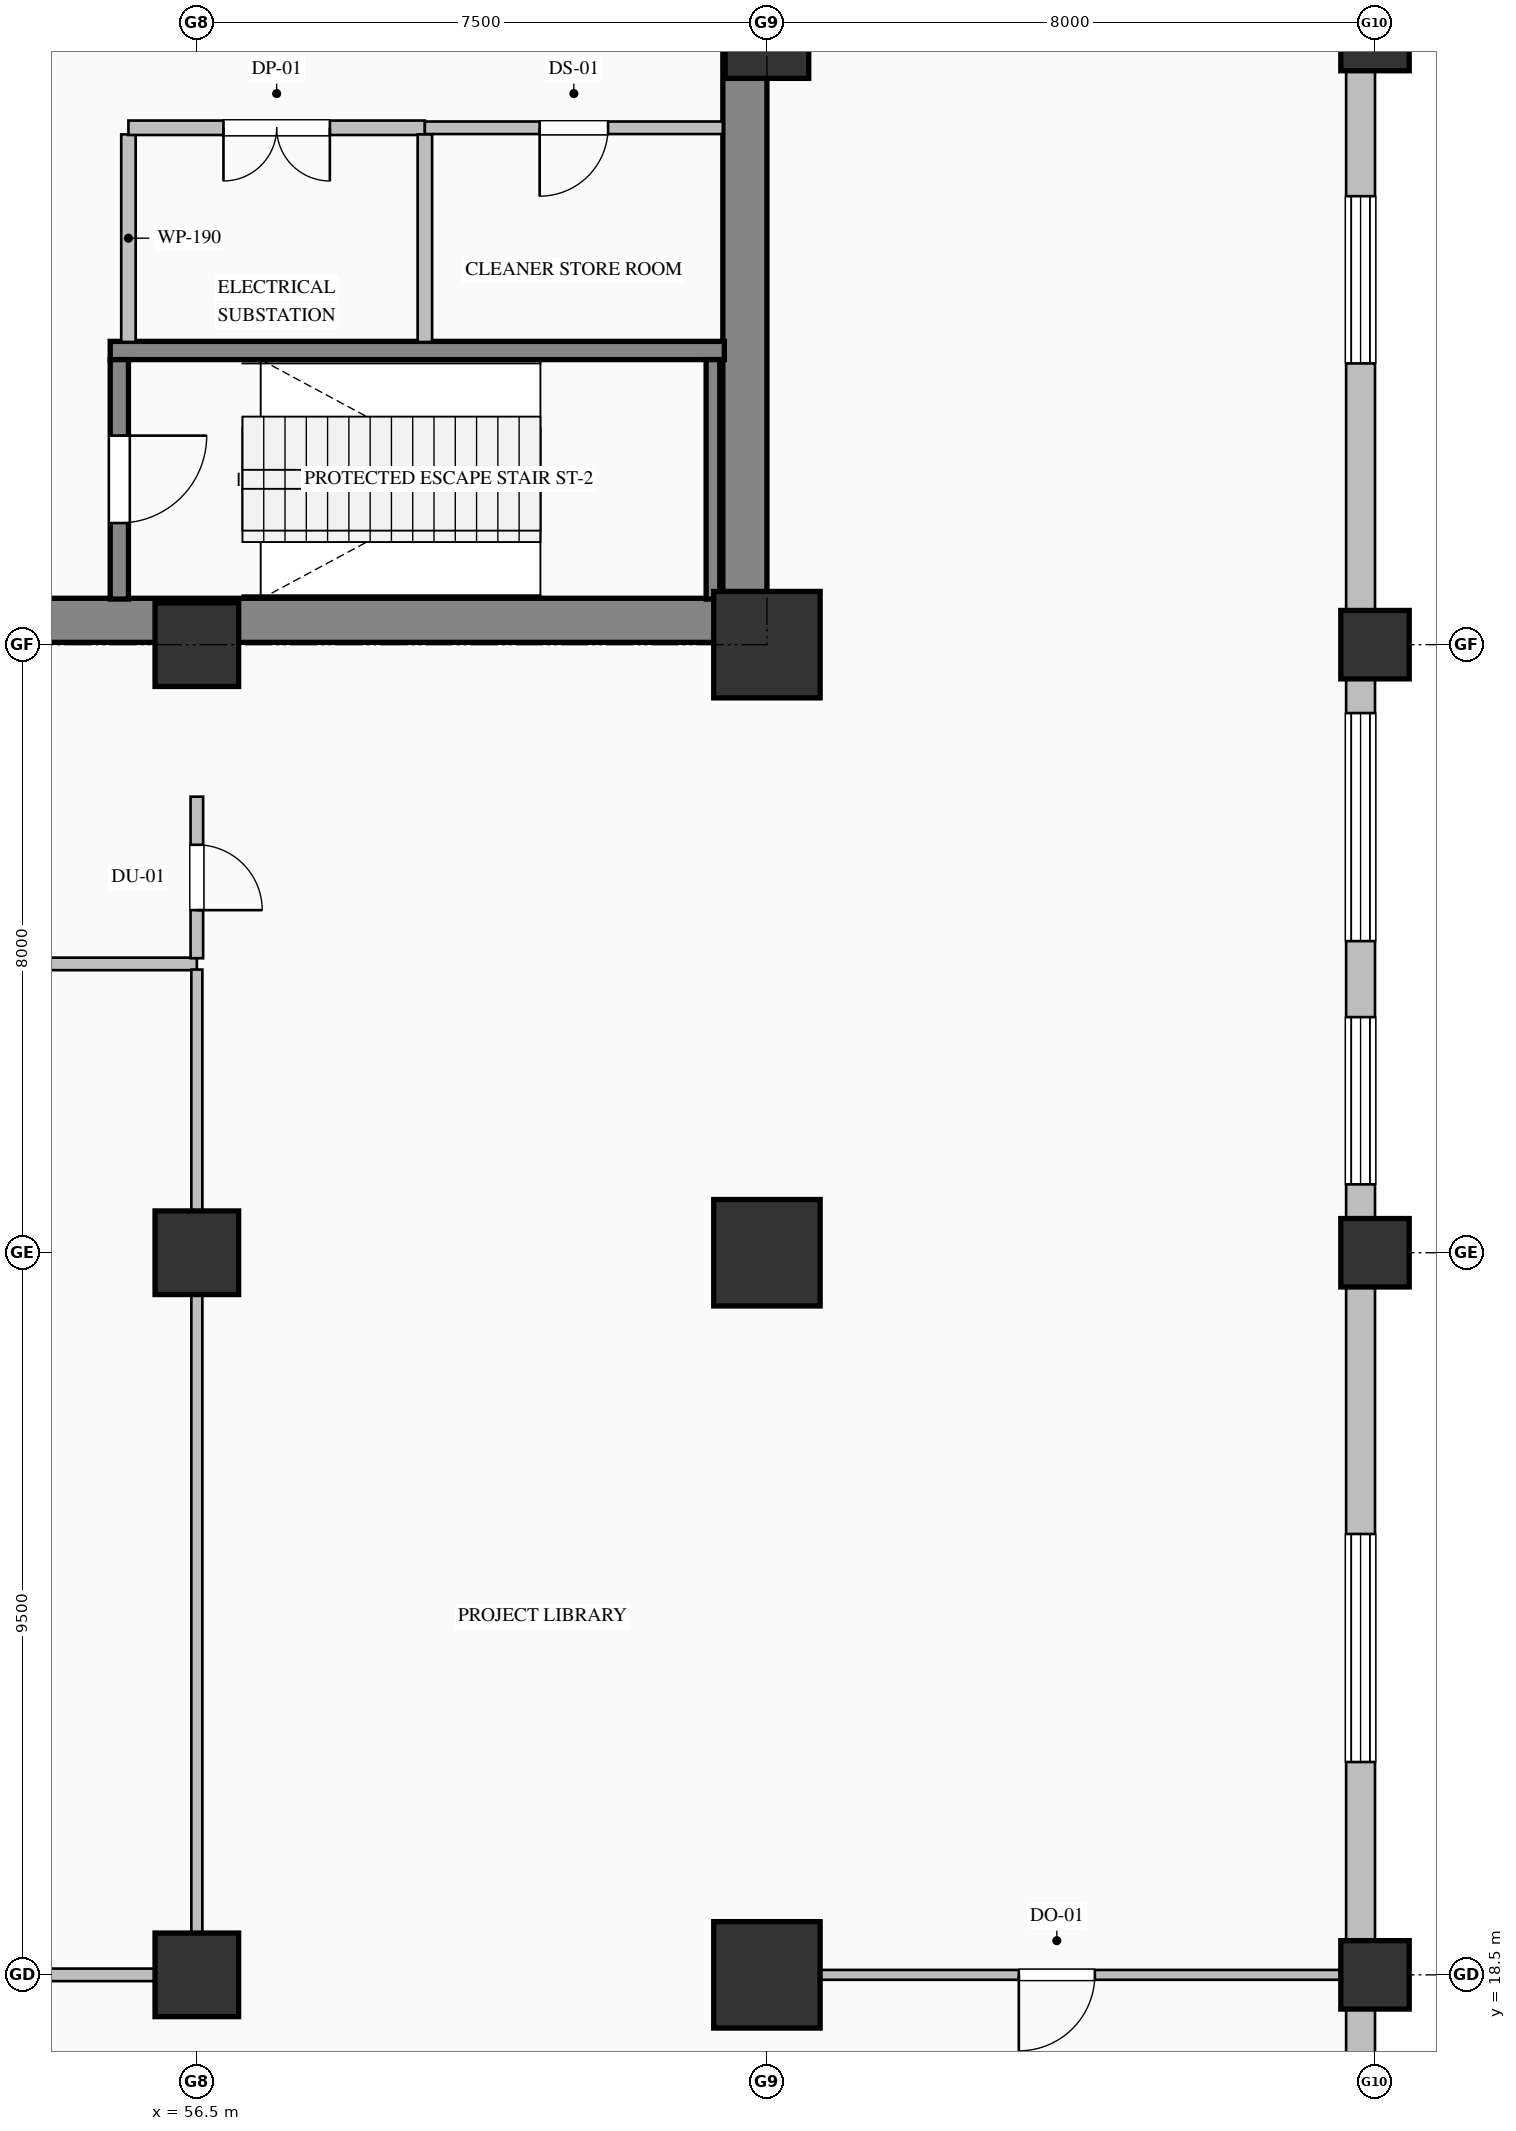
"""IFC4 building model, lengths in metres.
Left out: names, types, materials, properties, quantities, classifications, styles, units other than length and angle.
Written with IfcOpenShell. Run it as: python <this file> out.ifc"""

import sys

from ifc_helpers import new_model, si_unit, direction, frame, frame_2d, origin, origin_2d, place, context, subcontext, project, spatial, rectangle, hollow_rectangle, extrude, element, fill, save


model = new_model("IFC4")
c1 = context("Model", 3, precision=1e-05, world=origin(), true_north=direction((0.0, 1.0)))
c2 = subcontext(c1, "Body", "Model", "MODEL_VIEW")
j1 = project(units=[si_unit("LENGTHUNIT", "METRE"), si_unit("PLANEANGLEUNIT", "RADIAN")], contexts=[c1])
p1 = place(None, origin())
s1 = spatial("IfcSite", under=j1, at=p1, CompositionType="ELEMENT")
p2 = place(p1, origin())
s2 = spatial("IfcBuilding", under=s1, at=p2, CompositionType="ELEMENT")
p3 = place(p2, frame((0.0, 0.0, 17.4)))
s3 = spatial("IfcBuildingStorey", under=s2, at=p3, CompositionType="ELEMENT", Elevation=17.4)
p4 = place(p3, frame((63.71, 36.32, 0.0), z_axis=(0.0, 0.0, 1.0), x_axis=(0.0, 1.0, 0.0)))
e1 = element("IfcWall", 1, at=p4, inside=s3, PredefinedType="SHEAR", context=c2, shape_type="SweptSolid", body=[
    extrude(rectangle(XDim=15.1, YDim=0.58, at=frame_2d((7.55, 0.0))), origin(), (0.0, 0.0, 1.0), 5.14),
])
p5 = place(p3, frame((54.4, 36.32, 0.0), z_axis=(0.0, 0.0, 1.0), x_axis=(1.0, 0.0, 0.0)))
e2 = element("IfcWall", 2, at=p5, inside=s3, PredefinedType="SHEAR", context=c2, shape_type="SweptSolid", body=[
    extrude(rectangle(XDim=9.6, YDim=0.58, at=frame_2d((4.8, 0.0))), origin(), (0.0, 0.0, 1.0), 5.4),
])
for number, where, z_axis, x_axis in (
    (3, (56.5, 18.5, 0.0), (0.0, 0.0, 1.0), (1.0, 0.0, 0.0)),
    (4, (56.5, 28.0, 0.0), (0.0, 0.0, 1.0), (1.0, 0.0, 0.0)),
    (5, (56.5, 36.0, 0.0), (0.0, 0.0, 1.0), (1.0, 0.0, 0.0)),
):
    element("IfcColumn", number, at=place(p3, frame(where, z_axis=z_axis, x_axis=x_axis)), inside=s3, PredefinedType="COLUMN", context=c2, shape_type="SweptSolid", body=[
        extrude(rectangle(XDim=1.1, YDim=1.1, at=origin_2d()), origin(), (0.0, 0.0, 1.0), 5.4),
    ])
for number, where, z_axis, x_axis in (
    (6, (64.0, 18.5, 0.0), (0.0, 0.0, 1.0), (1.0, 0.0, 0.0)),
    (7, (64.0, 28.0, 0.0), (0.0, 0.0, 1.0), (1.0, 0.0, 0.0)),
    (8, (64.0, 36.0, 0.0), (0.0, 0.0, 1.0), (1.0, 0.0, 0.0)),
):
    element("IfcColumn", number, at=place(p3, frame(where, z_axis=z_axis, x_axis=x_axis)), inside=s3, PredefinedType="COLUMN", context=c2, shape_type="SweptSolid", body=[
        extrude(hollow_rectangle(XDim=1.4, YDim=1.4, WallThickness=0.05, at=origin_2d()), origin(), (0.0, 0.0, 1.0), 5.4),
    ])
p6 = place(p3, frame((64.0, 44.0, 0.0), z_axis=(0.0, 0.0, 1.0), x_axis=(1.0, 0.0, 0.0)))
e9 = element("IfcColumn", 9, at=p6, inside=s3, PredefinedType="COLUMN", context=c2, shape_type="SweptSolid", body=[
    extrude(rectangle(XDim=1.1, YDim=1.1, at=origin_2d()), origin(), (0.0, 0.0, 1.0), 5.4),
])
for number, where, z_axis, x_axis in (
    (10, (72.0, 18.5, 0.0), (0.0, 0.0, 1.0), (1.0, 0.0, 0.0)),
    (11, (72.0, 28.0, 0.0), (0.0, 0.0, 1.0), (1.0, 0.0, 0.0)),
    (12, (72.0, 36.0, 0.0), (0.0, 0.0, 1.0), (1.0, 0.0, 0.0)),
    (13, (72.0, 44.0, 0.0), (0.0, 0.0, 1.0), (1.0, 0.0, 0.0)),
):
    element("IfcColumn", number, at=place(p3, frame(where, z_axis=z_axis, x_axis=x_axis)), inside=s3, PredefinedType="PILASTER", context=c2, shape_type="SweptSolid", body=[
        extrude(rectangle(XDim=0.9, YDim=0.9, at=origin_2d()), origin(), (0.0, 0.0, 1.0), 5.4),
    ])
p7 = place(p3, frame((71.81, 48.0, 0.0), z_axis=(0.0, 0.0, 1.0), x_axis=(0.0, -1.0, 0.0)))
e14 = element("IfcWall", 14, at=p7, inside=s3, PredefinedType="SOLIDWALL", context=c2, shape_type="SweptSolid", body=[
    extrude(rectangle(XDim=44.0, YDim=0.38, at=frame_2d((22.0, 0.0))), origin(), (0.0, 0.0, 1.0), 4.64),
])
p8 = place(p7, frame((6.1, 0.0, 0.9)))
e15 = element("IfcOpeningElement", 15, at=p8, cuts=e14, PredefinedType="OPENING", context=c2, shape_type="SweptSolid", body=[
    extrude(rectangle(XDim=2.2, YDim=2.65, at=frame_2d((1.1, 1.325))), frame((0.0, 0.2, 0.0), z_axis=(0.0, -1.0, 0.0), x_axis=(1.0, 0.0, 0.0)), (0.0, 0.0, 1.0), 0.4),
])
p9 = place(p7, frame((12.9, 0.0, 0.85)))
e16 = element("IfcOpeningElement", 16, at=p9, cuts=e14, PredefinedType="OPENING", context=c2, shape_type="SweptSolid", body=[
    extrude(rectangle(XDim=3.0, YDim=3.2, at=frame_2d((1.5, 1.6))), frame((0.0, 0.2, 0.0), z_axis=(0.0, -1.0, 0.0), x_axis=(1.0, 0.0, 0.0)), (0.0, 0.0, 1.0), 0.4),
])
p10 = place(p7, frame((16.9, 0.0, 0.9)))
e17 = element("IfcOpeningElement", 17, at=p10, cuts=e14, PredefinedType="OPENING", context=c2, shape_type="SweptSolid", body=[
    extrude(rectangle(XDim=2.2, YDim=2.65, at=frame_2d((1.1, 1.325))), frame((0.0, 0.2, 0.0), z_axis=(0.0, -1.0, 0.0), x_axis=(1.0, 0.0, 0.0)), (0.0, 0.0, 1.0), 0.4),
])
p11 = place(p7, frame((23.7, 0.0, 0.85)))
e18 = element("IfcOpeningElement", 18, at=p11, cuts=e14, PredefinedType="OPENING", context=c2, shape_type="SweptSolid", body=[
    extrude(rectangle(XDim=3.0, YDim=3.2, at=frame_2d((1.5, 1.6))), frame((0.0, 0.2, 0.0), z_axis=(0.0, -1.0, 0.0), x_axis=(1.0, 0.0, 0.0)), (0.0, 0.0, 1.0), 0.4),
])
p12 = place(p7, frame((31.1, 0.0, 0.85)))
e19 = element("IfcOpeningElement", 19, at=p12, cuts=e14, PredefinedType="OPENING", context=c2, shape_type="SweptSolid", body=[
    extrude(rectangle(XDim=2.6, YDim=3.1, at=frame_2d((1.3, 1.55))), frame((0.0, 0.2, 0.0), z_axis=(0.0, -1.0, 0.0), x_axis=(1.0, 0.0, 0.0)), (0.0, 0.0, 1.0), 0.4),
])
p13 = place(p7, frame((38.5, 0.0, 0.9)))
e20 = element("IfcOpeningElement", 20, at=p13, cuts=e14, PredefinedType="OPENING", context=c2, shape_type="SweptSolid", body=[
    extrude(rectangle(XDim=2.2, YDim=2.65, at=frame_2d((1.1, 1.325))), frame((0.0, 0.2, 0.0), z_axis=(0.0, -1.0, 0.0), x_axis=(1.0, 0.0, 0.0)), (0.0, 0.0, 1.0), 0.4),
])
p14 = place(p3, frame((55.36, 39.87, 0.0), z_axis=(0.0, 0.0, 1.0), x_axis=(1.0, 0.0, 0.0)))
e21 = element("IfcWall", 21, at=p14, inside=s3, PredefinedType="SOLIDWALL", context=c2, shape_type="SweptSolid", body=[
    extrude(rectangle(XDim=8.08, YDim=0.24, at=frame_2d((4.04, 0.0))), origin(), (0.0, 0.0, 1.0), 5.4),
])
p15 = place(p3, frame((55.48, 39.75, 0.0), z_axis=(0.0, 0.0, 1.0), x_axis=(0.0, -1.0, 0.0)))
e22 = element("IfcWall", 22, at=p15, inside=s3, PredefinedType="SOLIDWALL", context=c2, shape_type="SweptSolid", body=[
    extrude(rectangle(XDim=3.15, YDim=0.24, at=frame_2d((1.575, 0.0))), origin(), (0.0, 0.0, 1.0), 5.4),
])
p16 = place(p15, frame((1.0, 0.0, 0.0)))
e23 = element("IfcOpeningElement", 23, at=p16, cuts=e22, PredefinedType="OPENING", context=c2, shape_type="SweptSolid", body=[
    extrude(rectangle(XDim=1.15, YDim=2.2, at=frame_2d((0.575, 1.1))), frame((0.0, 0.13, 0.0), z_axis=(0.0, -1.0, 0.0), x_axis=(1.0, 0.0, 0.0)), (0.0, 0.0, 1.0), 0.26),
])
p17 = place(p3, frame((63.29, 36.6, 0.0), z_axis=(0.0, 0.0, 1.0), x_axis=(0.0, 1.0, 0.0)))
e24 = element("IfcWall", 24, at=p17, inside=s3, PredefinedType="SOLIDWALL", context=c2, shape_type="SweptSolid", body=[
    extrude(rectangle(XDim=3.15, YDim=0.18, at=frame_2d((1.575, 0.0))), origin(), (0.0, 0.0, 1.0), 5.4),
])
p18 = place(p3, frame((55.6, 42.713, 0.0), z_axis=(0.0, 0.0, 1.0), x_axis=(0.0, -1.0, 0.0)))
e25 = element("IfcWall", 25, at=p18, inside=s3, PredefinedType="PARTITIONING", context=c2, shape_type="SweptSolid", body=[
    extrude(rectangle(XDim=2.731, YDim=0.19, at=frame_2d((1.365, 0.0))), origin(), (0.0, 0.0, 1.0), 5.14),
])
p19 = place(p3, frame((59.5, 42.8, 0.0), z_axis=(0.0, 0.0, 1.0), x_axis=(-1.0, 0.0, 0.0)))
e26 = element("IfcWall", 26, at=p19, inside=s3, PredefinedType="PARTITIONING", context=c2, shape_type="SweptSolid", body=[
    extrude(rectangle(XDim=3.9, YDim=0.19, at=frame_2d((1.95, 0.0))), origin(), (0.0, 0.0, 1.0), 5.14),
])
p20 = place(p19, frame((1.25, 0.0, 0.0)))
e27 = element("IfcOpeningElement", 27, at=p20, cuts=e26, PredefinedType="OPENING", context=c2, shape_type="SweptSolid", body=[
    extrude(rectangle(XDim=1.4, YDim=2.25, at=frame_2d((0.7, 1.125))), frame((0.0, 0.105, 0.0), z_axis=(0.0, -1.0, 0.0), x_axis=(1.0, 0.0, 0.0)), (0.0, 0.0, 1.0), 0.21),
])
p21 = place(p3, frame((63.42, 42.8, 0.0), z_axis=(0.0, 0.0, 1.0), x_axis=(-1.0, 0.0, 0.0)))
e28 = element("IfcWall", 28, at=p21, inside=s3, PredefinedType="PARTITIONING", context=c2, shape_type="SweptSolid", body=[
    extrude(rectangle(XDim=3.92, YDim=0.165, at=frame_2d((1.96, 0.0))), origin(), (0.0, 0.0, 1.0), 5.14),
])
p22 = place(p21, frame((1.51, 0.0, 0.0)))
e29 = element("IfcOpeningElement", 29, at=p22, cuts=e28, PredefinedType="OPENING", context=c2, shape_type="SweptSolid", body=[
    extrude(rectangle(XDim=0.9, YDim=2.15, at=frame_2d((0.45, 1.075))), frame((0.0, 0.093, 0.0), z_axis=(0.0, -1.0, 0.0), x_axis=(1.0, 0.0, 0.0)), (0.0, 0.0, 1.0), 0.185),
])
p23 = place(p3, frame((59.5, 42.713, 0.0), z_axis=(0.0, 0.0, 1.0), x_axis=(0.0, -1.0, 0.0)))
e30 = element("IfcWall", 30, at=p23, inside=s3, PredefinedType="PARTITIONING", context=c2, shape_type="SweptSolid", body=[
    extrude(rectangle(XDim=2.731, YDim=0.19, at=frame_2d((1.365, 0.0))), origin(), (0.0, 0.0, 1.0), 5.14),
])
p24 = place(p3, frame((56.5, 31.8, 0.0), z_axis=(0.0, 0.0, 1.0), x_axis=(-1.0, 0.0, 0.0)))
e31 = element("IfcWall", 31, at=p24, inside=s3, PredefinedType="PARTITIONING", context=c2, shape_type="SweptSolid", body=[
    extrude(rectangle(XDim=24.0, YDim=0.165, at=frame_2d((12.0, 0.0))), origin(), (0.0, 0.0, 1.0), 5.14),
])
p25 = place(p24, frame((11.45, 0.0, 0.0)))
e32 = element("IfcOpeningElement", 32, at=p25, cuts=e31, PredefinedType="OPENING", context=c2, shape_type="SweptSolid", body=[
    extrude(rectangle(XDim=1.1, YDim=2.2, at=frame_2d((0.55, 1.1))), frame((0.0, 0.093, 0.0), z_axis=(0.0, -1.0, 0.0), x_axis=(1.0, 0.0, 0.0)), (0.0, 0.0, 1.0), 0.185),
])
p26 = place(p3, frame((56.5, 34.0, 0.0), z_axis=(0.0, 0.0, 1.0), x_axis=(0.0, -1.0, 0.0)))
e33 = element("IfcWall", 33, at=p26, inside=s3, PredefinedType="PARTITIONING", context=c2, shape_type="SweptSolid", body=[
    extrude(rectangle(XDim=2.125, YDim=0.165, at=frame_2d((1.063, 0.0))), origin(), (0.0, 0.0, 1.0), 4.232),
])
p27 = place(p26, frame((0.633, 0.0, 0.0)))
e34 = element("IfcOpeningElement", 34, at=p27, cuts=e33, PredefinedType="OPENING", context=c2, shape_type="SweptSolid", body=[
    extrude(rectangle(XDim=0.86, YDim=2.1, at=frame_2d((0.43, 1.05))), frame((0.0, 0.093, 0.0), z_axis=(0.0, -1.0, 0.0), x_axis=(1.0, 0.0, 0.0)), (0.0, 0.0, 1.0), 0.185),
])
p28 = place(p3, frame((32.5, 18.5, 0.0), z_axis=(0.0, 0.0, 1.0), x_axis=(1.0, 0.0, 0.0)))
e35 = element("IfcWall", 35, at=p28, inside=s3, PredefinedType="PARTITIONING", context=c2, shape_type="SweptSolid", body=[
    extrude(rectangle(XDim=24.0, YDim=0.165, at=frame_2d((12.0, 0.0))), origin(), (0.0, 0.0, 1.0), 4.232),
])
p29 = place(p3, frame((56.5, 31.726, 0.0), z_axis=(0.0, 0.0, 1.0), x_axis=(0.0, -1.0, 0.0)))
e36 = element("IfcWall", 36, at=p29, inside=s3, PredefinedType="PARTITIONING", context=c2, shape_type="SweptSolid", body=[
    extrude(rectangle(XDim=13.151, YDim=0.145, at=frame_2d((6.576, 0.0))), origin(), (0.0, 0.0, 1.0), 4.232),
])
p30 = place(p3, frame((71.628, 18.5, 0.0), z_axis=(0.0, 0.0, 1.0), x_axis=(-1.0, 0.0, 0.0)))
e37 = element("IfcWall", 37, at=p30, inside=s3, PredefinedType="PARTITIONING", context=c2, shape_type="SweptSolid", body=[
    extrude(rectangle(XDim=7.628, YDim=0.13, at=frame_2d((3.814, 0.0))), origin(), (0.0, 0.0, 1.0), 4.232),
])
p31 = place(p30, frame((3.314, 0.0, 0.0)))
e38 = element("IfcOpeningElement", 38, at=p31, cuts=e37, PredefinedType="OPENING", context=c2, shape_type="SweptSolid", body=[
    extrude(rectangle(XDim=1.0, YDim=2.15, at=frame_2d((0.5, 1.075))), frame((0.0, 0.075, 0.0), z_axis=(0.0, -1.0, 0.0), x_axis=(1.0, 0.0, 0.0)), (0.0, 0.0, 1.0), 0.15),
])
p32 = place(p8, origin())
e39 = element("IfcWindow", 39, at=p32, inside=s3, PartitioningType="TRIPLE_PANEL_VERTICAL", PredefinedType="WINDOW", context=c2, shape_type="SweptSolid", body=[
    extrude(rectangle(XDim=2.2, YDim=2.65, at=frame_2d((1.1, 1.325))), frame((0.0, 0.15, 0.0), z_axis=(0.0, -1.0, 0.0), x_axis=(1.0, 0.0, 0.0)), (0.0, 0.0, 1.0), 0.06),
])
fill(e15, e39)
p33 = place(p9, origin())
e40 = element("IfcWindow", 40, at=p33, inside=s3, PartitioningType="TRIPLE_PANEL_VERTICAL", PredefinedType="WINDOW", context=c2, shape_type="SweptSolid", body=[
    extrude(rectangle(XDim=3.0, YDim=3.2, at=frame_2d((1.5, 1.6))), frame((0.0, 0.15, 0.0), z_axis=(0.0, -1.0, 0.0), x_axis=(1.0, 0.0, 0.0)), (0.0, 0.0, 1.0), 0.06),
])
fill(e16, e40)
p34 = place(p10, origin())
e41 = element("IfcWindow", 41, at=p34, inside=s3, PartitioningType="TRIPLE_PANEL_VERTICAL", PredefinedType="WINDOW", context=c2, shape_type="SweptSolid", body=[
    extrude(rectangle(XDim=2.2, YDim=2.65, at=frame_2d((1.1, 1.325))), frame((0.0, 0.15, 0.0), z_axis=(0.0, -1.0, 0.0), x_axis=(1.0, 0.0, 0.0)), (0.0, 0.0, 1.0), 0.06),
])
fill(e17, e41)
p35 = place(p11, origin())
e42 = element("IfcWindow", 42, at=p35, inside=s3, PartitioningType="TRIPLE_PANEL_VERTICAL", PredefinedType="WINDOW", context=c2, shape_type="SweptSolid", body=[
    extrude(rectangle(XDim=3.0, YDim=3.2, at=frame_2d((1.5, 1.6))), frame((0.0, 0.15, 0.0), z_axis=(0.0, -1.0, 0.0), x_axis=(1.0, 0.0, 0.0)), (0.0, 0.0, 1.0), 0.06),
])
fill(e18, e42)
p36 = place(p16, origin())
e43 = element("IfcDoor", 43, at=p36, inside=s3, OperationType="SINGLE_SWING_LEFT", PredefinedType="DOOR", context=c2, shape_type="SweptSolid", body=[
    extrude(rectangle(XDim=1.15, YDim=2.2, at=frame_2d((0.575, 1.1))), frame((0.0, 0.025, 0.0), z_axis=(0.0, -1.0, 0.0), x_axis=(1.0, 0.0, 0.0)), (0.0, 0.0, 1.0), 0.05),
])
fill(e23, e43)
p37 = place(p20, origin())
e44 = element("IfcDoor", 44, at=p37, inside=s3, OperationType="DOUBLE_DOOR_SINGLE_SWING", PredefinedType="DOOR", context=c2, shape_type="SweptSolid", body=[
    extrude(rectangle(XDim=1.4, YDim=2.25, at=frame_2d((0.7, 1.125))), frame((0.0, 0.025, 0.0), z_axis=(0.0, -1.0, 0.0), x_axis=(1.0, 0.0, 0.0)), (0.0, 0.0, 1.0), 0.05),
])
fill(e27, e44)
p38 = place(p22, origin())
e45 = element("IfcDoor", 45, at=p38, inside=s3, OperationType="SINGLE_SWING_RIGHT", PredefinedType="DOOR", context=c2, shape_type="SweptSolid", body=[
    extrude(rectangle(XDim=0.9, YDim=2.15, at=frame_2d((0.45, 1.075))), frame((0.0, 0.025, 0.0), z_axis=(0.0, -1.0, 0.0), x_axis=(1.0, 0.0, 0.0)), (0.0, 0.0, 1.0), 0.05),
])
fill(e29, e45)
p39 = place(p27, origin())
e46 = element("IfcDoor", 46, at=p39, inside=s3, OperationType="SINGLE_SWING_RIGHT", PredefinedType="DOOR", context=c2, shape_type="SweptSolid", body=[
    extrude(rectangle(XDim=0.86, YDim=2.1, at=frame_2d((0.43, 1.05))), frame((0.0, 0.025, 0.0), z_axis=(0.0, -1.0, 0.0), x_axis=(1.0, 0.0, 0.0)), (0.0, 0.0, 1.0), 0.05),
])
fill(e34, e46)
p40 = place(p31, origin())
e47 = element("IfcDoor", 47, at=p40, inside=s3, OperationType="SINGLE_SWING_RIGHT", PredefinedType="DOOR", context=c2, shape_type="SweptSolid", body=[
    extrude(rectangle(XDim=1.0, YDim=2.15, at=frame_2d((0.5, 1.075))), frame((0.0, 0.025, 0.0), z_axis=(0.0, -1.0, 0.0), x_axis=(1.0, 0.0, 0.0)), (0.0, 0.0, 1.0), 0.05),
])
fill(e38, e47)
save(model, sys.argv[1])
